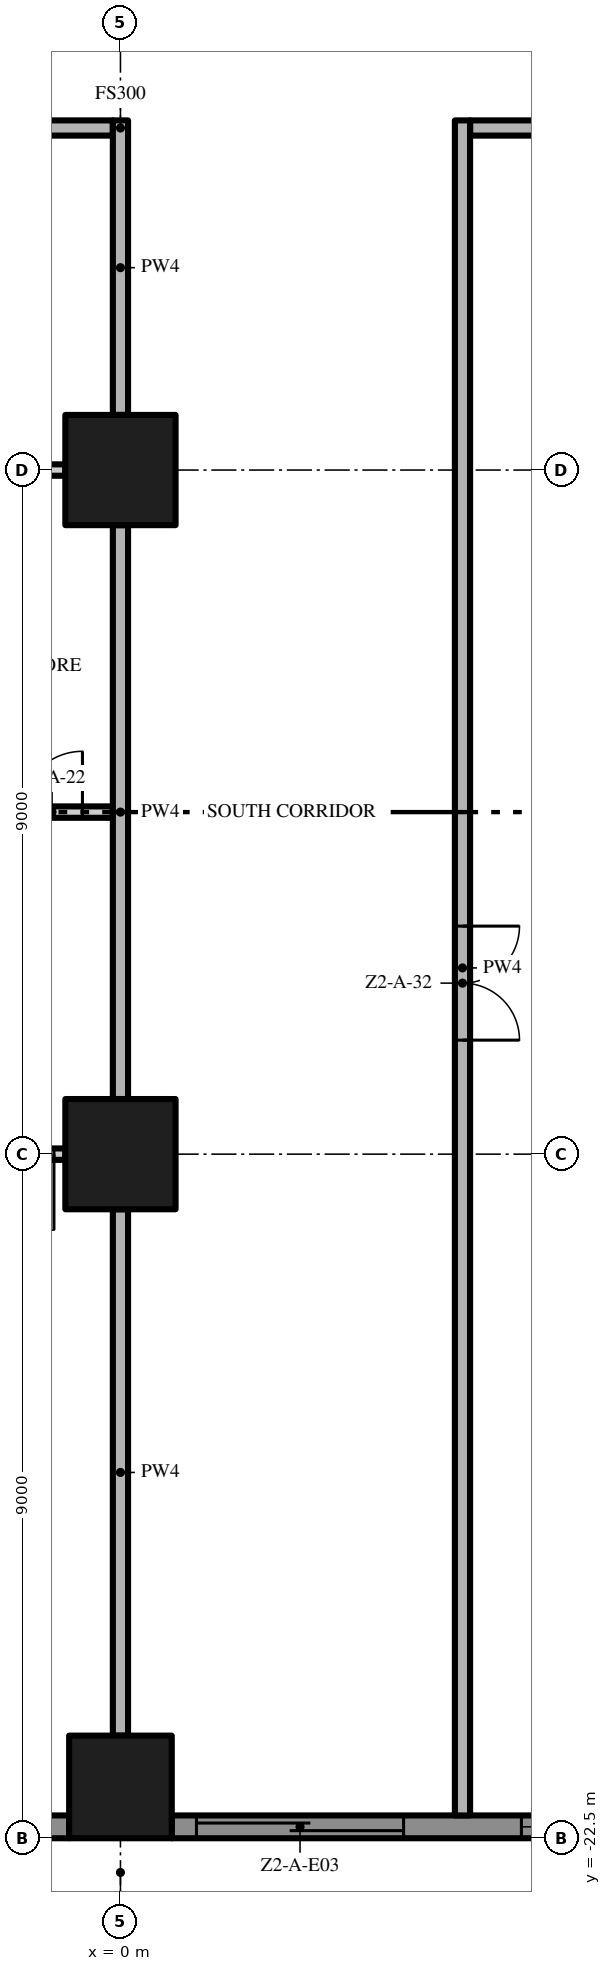
"""IFC4 building model, lengths in metres.
Left out: names, types, materials, properties, quantities, classifications, styles, units other than length and angle.
Written with IfcOpenShell. Run it as: python <this file> out.ifc"""

import sys

from ifc_helpers import new_model, si_unit, direction, frame, frame_2d, origin, origin_2d, place, context, subcontext, project, spatial, polyline, rectangle, outline, extrude, element, fill, save


model = new_model("IFC4")
c1 = context("Model", 3, precision=1e-05, world=origin(), true_north=direction((0.0, 1.0)))
c2 = subcontext(c1, "Body", "Model", "MODEL_VIEW")
j1 = project(units=[si_unit("LENGTHUNIT", "METRE"), si_unit("PLANEANGLEUNIT", "RADIAN")], contexts=[c1])
p1 = place(None, origin())
s1 = spatial("IfcSite", under=j1, at=p1, CompositionType="ELEMENT")
p2 = place(p1, origin())
s2 = spatial("IfcBuilding", under=s1, at=p2, CompositionType="ELEMENT")
p3 = place(p2, frame((0.0, 0.0, 69.4)))
s3 = spatial("IfcBuildingStorey", under=s2, at=p3, CompositionType="ELEMENT", Elevation=69.4)
p4 = place(p3, frame((0.0, -13.5, 0.0), z_axis=(0.0, 0.0, 1.0), x_axis=(1.0, 0.0, 0.0)))
e1 = element("IfcColumn", 1, at=p4, inside=s3, PredefinedType="COLUMN", context=c2, shape_type="SweptSolid", body=[
    extrude(rectangle(XDim=1.45, YDim=1.45, at=origin_2d()), origin(), (0.0, 0.0, 1.0), 3.5),
])
p5 = place(p3, frame((0.0, -21.825, 0.0), z_axis=(0.0, 0.0, 1.0), x_axis=(1.0, 0.0, 0.0)))
e2 = element("IfcColumn", 2, at=p5, inside=s3, PredefinedType="COLUMN", context=c2, shape_type="SweptSolid", body=[
    extrude(rectangle(XDim=1.35, YDim=1.35, at=origin_2d()), origin(), (0.0, 0.0, 1.0), 3.5),
])
p6 = place(p3, frame((0.0, -4.5, 0.0), z_axis=(0.0, 0.0, 1.0), x_axis=(1.0, 0.0, 0.0)))
e3 = element("IfcColumn", 3, at=p6, inside=s3, PredefinedType="COLUMN", context=c2, shape_type="SweptSolid", body=[
    extrude(rectangle(XDim=1.45, YDim=1.45, at=origin_2d()), origin(), (0.0, 0.0, 1.0), 3.5),
])
p7 = place(p3, frame((-0.675, -22.35, 0.0), z_axis=(0.0, 0.0, 1.0), x_axis=(-1.0, 0.0, 0.0)))
e4 = element("IfcWall", 4, at=p7, inside=s3, PredefinedType="SOLIDWALL", context=c2, shape_type="SweptSolid", body=[
    extrude(rectangle(XDim=7.65, YDim=0.3, at=frame_2d((3.825, 0.0))), origin(), (0.0, 0.0, 1.0), 3.5),
])
p8 = place(p7, frame((4.6, 0.0, 0.45)))
e5 = element("IfcOpeningElement", 5, at=p8, cuts=e4, PredefinedType="OPENING", context=c2, shape_type="SweptSolid", body=[
    extrude(rectangle(XDim=2.725, YDim=2.65, at=frame_2d((1.363, 1.325))), frame((0.0, 0.16, 0.0), z_axis=(0.0, -1.0, 0.0), x_axis=(1.0, 0.0, 0.0)), (0.0, 0.0, 1.0), 0.32),
])
p9 = place(p7, frame((0.325, 0.0, 0.0)))
e6 = element("IfcOpeningElement", 6, at=p9, cuts=e4, PredefinedType="OPENING", context=c2, shape_type="SweptSolid", body=[
    extrude(rectangle(XDim=2.725, YDim=2.4, at=frame_2d((1.363, 1.2))), frame((0.0, 0.16, 0.0), z_axis=(0.0, -1.0, 0.0), x_axis=(1.0, 0.0, 0.0)), (0.0, 0.0, 1.0), 0.32),
])
p10 = place(p3, frame((8.325, -22.35, 0.0), z_axis=(0.0, 0.0, 1.0), x_axis=(-1.0, 0.0, 0.0)))
e7 = element("IfcWall", 7, at=p10, inside=s3, PredefinedType="SOLIDWALL", context=c2, shape_type="SweptSolid", body=[
    extrude(rectangle(XDim=7.65, YDim=0.3, at=frame_2d((3.825, 0.0))), origin(), (0.0, 0.0, 1.0), 3.5),
])
p11 = place(p10, frame((4.6, 0.0, 0.0)))
e8 = element("IfcOpeningElement", 8, at=p11, cuts=e7, PredefinedType="OPENING", context=c2, shape_type="SweptSolid", body=[
    extrude(rectangle(XDim=2.725, YDim=2.4, at=frame_2d((1.363, 1.2))), frame((0.0, 0.16, 0.0), z_axis=(0.0, -1.0, 0.0), x_axis=(1.0, 0.0, 0.0)), (0.0, 0.0, 1.0), 0.32),
])
p12 = place(p10, frame((0.325, 0.0, 0.45)))
e9 = element("IfcOpeningElement", 9, at=p12, cuts=e7, PredefinedType="OPENING", context=c2, shape_type="SweptSolid", body=[
    extrude(rectangle(XDim=2.725, YDim=2.65, at=frame_2d((1.363, 1.325))), frame((0.0, 0.16, 0.0), z_axis=(0.0, -1.0, 0.0), x_axis=(1.0, 0.0, 0.0)), (0.0, 0.0, 1.0), 0.32),
])
p13 = place(p3, origin())
e10 = element("IfcWall", 10, at=p13, inside=s3, PredefinedType="USERDEFINED", context=c2, shape_type="SweptSolid", body=[
    extrude(outline(polyline([(-22.5, -23.1), (-21.0, -23.329), (-19.5, -23.929), (-18.0, -24.671), (-16.5, -25.271), (-15.0, -25.5), (-13.5, -25.271), (-12.0, -24.671), (-10.5, -23.929), (-9.0, -23.329), (-7.5, -23.1), (-6.0, -23.329), (-4.5, -23.929), (-3.0, -24.671), (-1.5, -25.271), (0.0, -25.5), (1.5, -25.271), (3.0, -24.671), (4.5, -23.929), (6.0, -23.329), (7.5, -23.1), (9.0, -23.329), (10.5, -23.929), (12.0, -24.671), (13.5, -25.271), (15.0, -25.5), (16.5, -25.271), (18.0, -24.671), (19.5, -23.929), (21.0, -23.329), (22.5, -23.1), (22.462, -22.853), (20.934, -23.086), (19.398, -23.701), (17.898, -24.442), (16.434, -25.028), (15.0, -25.247), (13.566, -25.028), (12.102, -24.442), (10.602, -23.701), (9.066, -23.086), (7.5, -22.847), (5.934, -23.086), (4.398, -23.701), (2.898, -24.442), (1.434, -25.028), (0.0, -25.247), (-1.434, -25.028), (-2.898, -24.442), (-4.398, -23.701), (-5.934, -23.086), (-7.5, -22.847), (-9.066, -23.086), (-10.602, -23.701), (-12.102, -24.442), (-13.566, -25.028), (-15.0, -25.247), (-16.434, -25.028), (-17.898, -24.442), (-19.398, -23.701), (-20.934, -23.086), (-22.462, -22.853), (-22.5, -23.1)])), origin(), (0.0, 0.0, 1.0), 0.9),
])
p14 = place(p3, frame((-0.725, -13.5, 0.0), z_axis=(0.0, 0.0, 1.0), x_axis=(-1.0, 0.0, 0.0)))
e11 = element("IfcWall", 11, at=p14, inside=s3, PredefinedType="PARTITIONING", context=c2, shape_type="SweptSolid", body=[
    extrude(rectangle(XDim=7.55, YDim=0.15, at=frame_2d((3.775, 0.0))), origin(), (0.0, 0.0, 1.0), 3.5),
])
p15 = place(p14, frame((5.3, 0.0, 0.0)))
e12 = element("IfcOpeningElement", 12, at=p15, cuts=e11, PredefinedType="OPENING", context=c2, shape_type="SweptSolid", body=[
    extrude(rectangle(XDim=1.5, YDim=2.4, at=frame_2d((0.75, 1.2))), frame((0.0, 0.085, 0.0), z_axis=(0.0, -1.0, 0.0), x_axis=(1.0, 0.0, 0.0)), (0.0, 0.0, 1.0), 0.17),
])
p16 = place(p14, frame((0.15, 0.0, 0.0)))
e13 = element("IfcOpeningElement", 13, at=p16, cuts=e11, PredefinedType="OPENING", context=c2, shape_type="SweptSolid", body=[
    extrude(rectangle(XDim=1.0, YDim=2.4, at=frame_2d((0.5, 1.2))), frame((0.0, 0.085, 0.0), z_axis=(0.0, -1.0, 0.0), x_axis=(1.0, 0.0, 0.0)), (0.0, 0.0, 1.0), 0.17),
])
p17 = place(p3, frame((-10.725, -9.0, 0.0), z_axis=(0.0, 0.0, 1.0), x_axis=(1.0, 0.0, 0.0)))
e14 = element("IfcWall", 14, at=p17, inside=s3, PredefinedType="PARTITIONING", context=c2, shape_type="SweptSolid", body=[
    extrude(rectangle(XDim=10.625, YDim=0.15, at=frame_2d((5.312, 0.0))), origin(), (0.0, 0.0, 1.0), 3.5),
])
p18 = place(p17, frame((2.1, 0.0, 0.0)))
e15 = element("IfcOpeningElement", 15, at=p18, cuts=e14, PredefinedType="OPENING", context=c2, shape_type="SweptSolid", body=[
    extrude(rectangle(XDim=0.9, YDim=2.1, at=frame_2d((0.45, 1.05))), frame((0.0, 0.085, 0.0), z_axis=(0.0, -1.0, 0.0), x_axis=(1.0, 0.0, 0.0)), (0.0, 0.0, 1.0), 0.17),
])
p19 = place(p17, frame((9.425, 0.0, 0.0)))
e16 = element("IfcOpeningElement", 16, at=p19, cuts=e14, PredefinedType="OPENING", context=c2, shape_type="SweptSolid", body=[
    extrude(rectangle(XDim=0.8, YDim=2.0, at=frame_2d((0.4, 1.0))), frame((0.0, 0.085, 0.0), z_axis=(0.0, -1.0, 0.0), x_axis=(1.0, 0.0, 0.0)), (0.0, 0.0, 1.0), 0.17),
])
p20 = place(p3, frame((-8.275, -4.5, 0.0), z_axis=(0.0, 0.0, 1.0), x_axis=(1.0, 0.0, 0.0)))
e17 = element("IfcWall", 17, at=p20, inside=s3, PredefinedType="PARTITIONING", context=c2, shape_type="SweptSolid", body=[
    extrude(rectangle(XDim=7.55, YDim=0.15, at=frame_2d((3.775, 0.0))), origin(), (0.0, 0.0, 1.0), 3.5),
])
p21 = place(p3, frame((-0.1, 0.0, 0.0), z_axis=(0.0, 0.0, 1.0), x_axis=(-1.0, 0.0, 0.0)))
e18 = element("IfcWall", 18, at=p21, inside=s3, PredefinedType="PARTITIONING", context=c2, shape_type="SweptSolid", body=[
    extrude(rectangle(XDim=17.3, YDim=0.2, at=frame_2d((8.65, 0.0))), origin(), (0.0, 0.0, 1.0), 3.5),
])
p22 = place(p21, frame((8.15, 0.0, 0.0)))
e19 = element("IfcOpeningElement", 19, at=p22, cuts=e18, PredefinedType="OPENING", context=c2, shape_type="SweptSolid", body=[
    extrude(rectangle(XDim=1.5, YDim=2.4, at=frame_2d((0.75, 1.2))), frame((0.0, 0.11, 0.0), z_axis=(0.0, -1.0, 0.0), x_axis=(1.0, 0.0, 0.0)), (0.0, 0.0, 1.0), 0.22),
])
p23 = place(p3, frame((4.6, 0.0, 0.0), z_axis=(0.0, 0.0, 1.0), x_axis=(1.0, 0.0, 0.0)))
e20 = element("IfcWall", 20, at=p23, inside=s3, PredefinedType="PARTITIONING", context=c2, shape_type="SweptSolid", body=[
    extrude(rectangle(XDim=12.8, YDim=0.2, at=frame_2d((6.4, 0.0))), origin(), (0.0, 0.0, 1.0), 3.5),
])
p24 = place(p3, frame((0.0, -21.15, 0.0), z_axis=(0.0, 0.0, 1.0), x_axis=(0.0, 1.0, 0.0)))
e21 = element("IfcWall", 21, at=p24, inside=s3, PredefinedType="PARTITIONING", context=c2, shape_type="SweptSolid", body=[
    extrude(rectangle(XDim=6.925, YDim=0.2, at=frame_2d((3.462, 0.0))), origin(), (0.0, 0.0, 1.0), 3.5),
])
p25 = place(p3, frame((0.0, -12.775, 0.0), z_axis=(0.0, 0.0, 1.0), x_axis=(0.0, 1.0, 0.0)))
e22 = element("IfcWall", 22, at=p25, inside=s3, PredefinedType="PARTITIONING", context=c2, shape_type="SweptSolid", body=[
    extrude(rectangle(XDim=7.55, YDim=0.2, at=frame_2d((3.775, 0.0))), origin(), (0.0, 0.0, 1.0), 3.5),
])
p26 = place(p3, frame((0.0, -3.775, 0.0), z_axis=(0.0, 0.0, 1.0), x_axis=(0.0, 1.0, 0.0)))
e23 = element("IfcWall", 23, at=p26, inside=s3, PredefinedType="PARTITIONING", context=c2, shape_type="SweptSolid", body=[
    extrude(rectangle(XDim=3.875, YDim=0.2, at=frame_2d((1.938, 0.0))), origin(), (0.0, 0.0, 1.0), 3.5),
])
p27 = place(p3, frame((4.5, 0.1, 0.0), z_axis=(0.0, 0.0, 1.0), x_axis=(0.0, -1.0, 0.0)))
e24 = element("IfcWall", 24, at=p27, inside=s3, PredefinedType="PARTITIONING", context=c2, shape_type="SweptSolid", body=[
    extrude(rectangle(XDim=22.3, YDim=0.2, at=frame_2d((11.15, 0.0))), origin(), (0.0, 0.0, 1.0), 3.5),
])
p28 = place(p27, frame((10.6, 0.0, 0.0)))
e25 = element("IfcOpeningElement", 25, at=p28, cuts=e24, PredefinedType="OPENING", context=c2, shape_type="SweptSolid", body=[
    extrude(rectangle(XDim=1.5, YDim=2.4, at=frame_2d((0.75, 1.2))), frame((0.0, 0.11, 0.0), z_axis=(0.0, -1.0, 0.0), x_axis=(1.0, 0.0, 0.0)), (0.0, 0.0, 1.0), 0.22),
])
p29 = place(p11, origin())
e26 = element("IfcDoor", 26, at=p29, inside=s3, OperationType="SINGLE_SWING_LEFT", PredefinedType="DOOR", context=c2, shape_type="SweptSolid", body=[
    extrude(rectangle(XDim=2.725, YDim=2.4, at=frame_2d((1.363, 1.2))), frame((0.0, 0.025, 0.0), z_axis=(0.0, -1.0, 0.0), x_axis=(1.0, 0.0, 0.0)), (0.0, 0.0, 1.0), 0.05),
])
fill(e8, e26)
p30 = place(p12, origin())
e27 = element("IfcWindow", 27, at=p30, inside=s3, PartitioningType="SINGLE_PANEL", PredefinedType="WINDOW", context=c2, shape_type="SweptSolid", body=[
    extrude(rectangle(XDim=2.725, YDim=2.65, at=frame_2d((1.363, 1.325))), frame((0.0, 0.03, 0.0), z_axis=(0.0, -1.0, 0.0), x_axis=(1.0, 0.0, 0.0)), (0.0, 0.0, 1.0), 0.06),
])
fill(e9, e27)
p31 = place(p19, origin())
e28 = element("IfcDoor", 28, at=p31, inside=s3, OperationType="SINGLE_SWING_RIGHT", PredefinedType="DOOR", context=c2, shape_type="SweptSolid", body=[
    extrude(rectangle(XDim=0.8, YDim=2.0, at=frame_2d((0.4, 1.0))), frame((0.0, 0.025, 0.0), z_axis=(0.0, -1.0, 0.0), x_axis=(1.0, 0.0, 0.0)), (0.0, 0.0, 1.0), 0.05),
])
fill(e16, e28)
p32 = place(p16, origin())
e29 = element("IfcDoor", 29, at=p32, inside=s3, OperationType="SINGLE_SWING_LEFT", PredefinedType="DOOR", context=c2, shape_type="SweptSolid", body=[
    extrude(rectangle(XDim=1.0, YDim=2.4, at=frame_2d((0.5, 1.2))), frame((0.0, 0.025, 0.0), z_axis=(0.0, -1.0, 0.0), x_axis=(1.0, 0.0, 0.0)), (0.0, 0.0, 1.0), 0.05),
])
fill(e13, e29)
p33 = place(p28, origin())
e30 = element("IfcDoor", 30, at=p33, inside=s3, OperationType="DOUBLE_DOOR_SINGLE_SWING", PredefinedType="DOOR", context=c2, shape_type="SweptSolid", body=[
    extrude(rectangle(XDim=1.5, YDim=2.4, at=frame_2d((0.75, 1.2))), frame((0.0, 0.025, 0.0), z_axis=(0.0, -1.0, 0.0), x_axis=(1.0, 0.0, 0.0)), (0.0, 0.0, 1.0), 0.05),
])
fill(e25, e30)
save(model, sys.argv[1])
